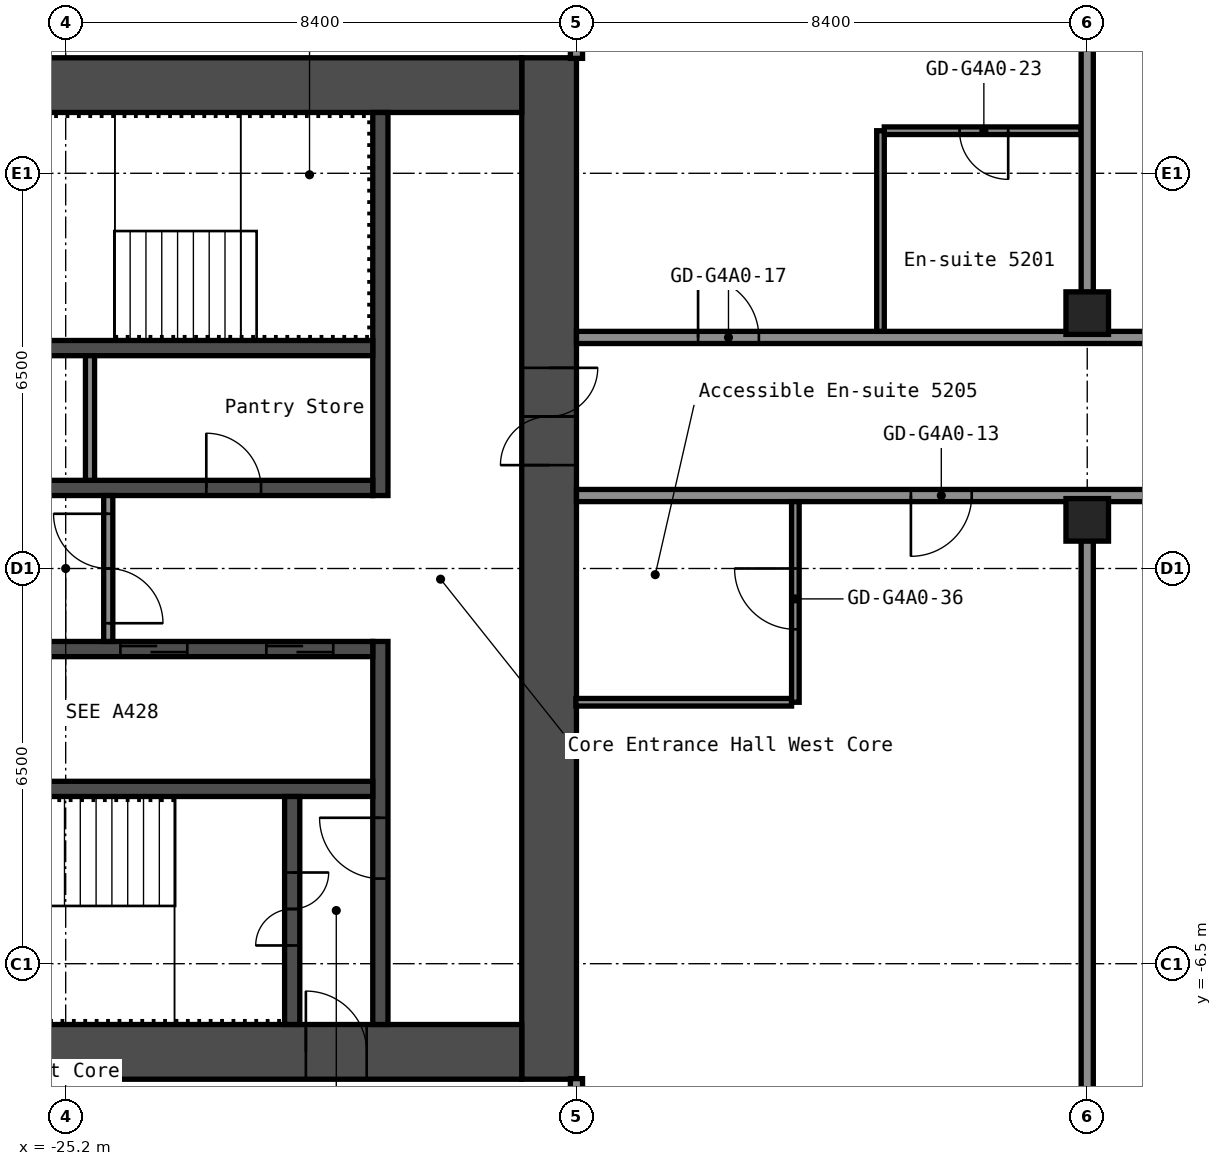
"""IFC4 building model, lengths in metres.
Left out: names, types, materials, properties, quantities, classifications, styles, units other than length and angle.
Written with IfcOpenShell. Run it as: python <this file> out.ifc"""

import sys

from ifc_helpers import new_model, si_unit, direction, frame, frame_2d, origin, origin_2d, place, context, subcontext, project, spatial, rectangle, hollow_rectangle, extrude, element, fill, save


model = new_model("IFC4")
c1 = context("Model", 3, precision=1e-05, world=origin(), true_north=direction((0.0, 1.0)))
c2 = subcontext(c1, "Body", "Model", "MODEL_VIEW")
j1 = project(units=[si_unit("LENGTHUNIT", "METRE"), si_unit("PLANEANGLEUNIT", "RADIAN")], contexts=[c1])
p1 = place(None, origin())
s1 = spatial("IfcSite", under=j1, at=p1, CompositionType="ELEMENT")
p2 = place(p1, origin())
s2 = spatial("IfcBuilding", under=s1, at=p2, CompositionType="ELEMENT")
p3 = place(p2, frame((0.0, 0.0, 186.6)))
s3 = spatial("IfcBuildingStorey", under=s2, at=p3, CompositionType="ELEMENT", Elevation=186.6)
for number, where, z_axis, x_axis in (
    (1, (-8.4, 0.8, 0.0), (0.0, 0.0, 1.0), (1.0, 0.0, 0.0)),
    (2, (-8.4, 4.2, 0.0), (0.0, 0.0, 1.0), (1.0, 0.0, 0.0)),
):
    element("IfcColumn", number, at=place(p3, frame(where, z_axis=z_axis, x_axis=x_axis)), inside=s3, PredefinedType="COLUMN", context=c2, shape_type="SweptSolid", body=[
        extrude(hollow_rectangle(XDim=0.7, YDim=0.7, WallThickness=0.028, at=origin_2d()), origin(), (0.0, 0.0, 1.0), 2.75),
    ])
p4 = place(p3, frame((-17.25, -8.4, 0.0), z_axis=(0.0, 0.0, 1.0), x_axis=(0.0, 1.0, 0.0)))
e3 = element("IfcWall", 3, at=p4, inside=s3, PredefinedType="SHEAR", context=c2, shape_type="SweptSolid", body=[
    extrude(rectangle(XDim=16.8, YDim=0.9, at=frame_2d((8.4, 0.0))), origin(), (0.0, 0.0, 1.0), 2.75),
])
p5 = place(p4, frame((10.1, 0.0, 0.0)))
e4 = element("IfcOpeningElement", 4, at=p5, cuts=e3, PredefinedType="OPENING", context=c2, shape_type="SweptSolid", body=[
    extrude(rectangle(XDim=1.6, YDim=2.1, at=frame_2d((0.8, 1.05))), frame((0.0, 0.46, 0.0), z_axis=(0.0, -1.0, 0.0), x_axis=(1.0, 0.0, 0.0)), (0.0, 0.0, 1.0), 0.92),
])
p6 = place(p3, frame((-32.7, 7.95, 0.0), z_axis=(0.0, 0.0, 1.0), x_axis=(1.0, 0.0, 0.0)))
e5 = element("IfcWall", 5, at=p6, inside=s3, PredefinedType="SHEAR", context=c2, shape_type="SweptSolid", body=[
    extrude(rectangle(XDim=15.0, YDim=0.9, at=frame_2d((7.5, 0.0))), origin(), (0.0, 0.0, 1.0), 2.75),
])
p7 = place(p6, frame((3.4, 0.0, 0.0)))
e6 = element("IfcOpeningElement", 6, at=p7, cuts=e5, PredefinedType="OPENING", context=c2, shape_type="SweptSolid", body=[
    extrude(rectangle(XDim=1.2, YDim=2.1, at=frame_2d((0.6, 1.05))), frame((0.0, 0.46, 0.0), z_axis=(0.0, -1.0, 0.0), x_axis=(1.0, 0.0, 0.0)), (0.0, 0.0, 1.0), 0.92),
])
p8 = place(p6, frame((0.75, 0.0, 0.0)))
e7 = element("IfcOpeningElement", 7, at=p8, cuts=e5, PredefinedType="OPENING", context=c2, shape_type="SweptSolid", body=[
    extrude(rectangle(XDim=0.9, YDim=2.1, at=frame_2d((0.45, 1.05))), frame((0.0, 0.46, 0.0), z_axis=(0.0, -1.0, 0.0), x_axis=(1.0, 0.0, 0.0)), (0.0, 0.0, 1.0), 0.92),
])
p9 = place(p3, frame((-32.7, -7.95, 0.0), z_axis=(0.0, 0.0, 1.0), x_axis=(1.0, 0.0, 0.0)))
e8 = element("IfcWall", 8, at=p9, inside=s3, PredefinedType="SHEAR", context=c2, shape_type="SweptSolid", body=[
    extrude(rectangle(XDim=15.0, YDim=0.9, at=frame_2d((7.5, 0.0))), origin(), (0.0, 0.0, 1.0), 2.75),
])
p10 = place(p9, frame((11.45, 0.0, 0.0)))
e9 = element("IfcOpeningElement", 9, at=p10, cuts=e8, PredefinedType="OPENING", context=c2, shape_type="SweptSolid", body=[
    extrude(rectangle(XDim=1.0, YDim=2.1, at=frame_2d((0.5, 1.05))), frame((0.0, 0.46, 0.0), z_axis=(0.0, -1.0, 0.0), x_axis=(1.0, 0.0, 0.0)), (0.0, 0.0, 1.0), 0.92),
])
p11 = place(p3, frame((-20.025, 1.2, 0.0), z_axis=(0.0, 0.0, 1.0), x_axis=(0.0, 1.0, 0.0)))
e10 = element("IfcWall", 10, at=p11, inside=s3, PredefinedType="SHEAR", context=c2, shape_type="SweptSolid", body=[
    extrude(rectangle(XDim=6.3, YDim=0.25, at=frame_2d((3.15, 0.0))), origin(), (0.0, 0.0, 1.0), 2.75),
])
p12 = place(p3, frame((-20.025, -7.5, 0.0), z_axis=(0.0, 0.0, 1.0), x_axis=(0.0, 1.0, 0.0)))
e11 = element("IfcWall", 11, at=p12, inside=s3, PredefinedType="SHEAR", context=c2, shape_type="SweptSolid", body=[
    extrude(rectangle(XDim=6.3, YDim=0.25, at=frame_2d((3.15, 0.0))), origin(), (0.0, 0.0, 1.0), 2.75),
])
p13 = place(p12, frame((2.4, 0.0, 0.0)))
e12 = element("IfcOpeningElement", 12, at=p13, cuts=e11, PredefinedType="OPENING", context=c2, shape_type="SweptSolid", body=[
    extrude(rectangle(XDim=1.0, YDim=2.1, at=frame_2d((0.5, 1.05))), frame((0.0, 0.135, 0.0), z_axis=(0.0, -1.0, 0.0), x_axis=(1.0, 0.0, 0.0)), (0.0, 0.0, 1.0), 0.27),
])
p14 = place(p3, frame((-27.65, 1.325, 0.0), z_axis=(0.0, 0.0, 1.0), x_axis=(1.0, 0.0, 0.0)))
e13 = element("IfcWall", 13, at=p14, inside=s3, PredefinedType="SHEAR", context=c2, shape_type="SweptSolid", body=[
    extrude(rectangle(XDim=7.5, YDim=0.25, at=frame_2d((3.75, 0.0))), origin(), (0.0, 0.0, 1.0), 2.75),
])
p15 = place(p14, frame((4.762, 0.0, 0.0)))
e14 = element("IfcOpeningElement", 14, at=p15, cuts=e13, PredefinedType="OPENING", context=c2, shape_type="SweptSolid", body=[
    extrude(rectangle(XDim=0.9, YDim=2.1, at=frame_2d((0.45, 1.05))), frame((0.0, 0.135, 0.0), z_axis=(0.0, -1.0, 0.0), x_axis=(1.0, 0.0, 0.0)), (0.0, 0.0, 1.0), 0.27),
])
p16 = place(p14, frame((1.062, 0.0, 0.0)))
e15 = element("IfcOpeningElement", 15, at=p16, cuts=e13, PredefinedType="OPENING", context=c2, shape_type="SweptSolid", body=[
    extrude(rectangle(XDim=0.9, YDim=2.1, at=frame_2d((0.45, 1.05))), frame((0.0, 0.135, 0.0), z_axis=(0.0, -1.0, 0.0), x_axis=(1.0, 0.0, 0.0)), (0.0, 0.0, 1.0), 0.27),
])
p17 = place(p3, frame((-27.65, 3.625, 0.0), z_axis=(0.0, 0.0, 1.0), x_axis=(1.0, 0.0, 0.0)))
e16 = element("IfcWall", 16, at=p17, inside=s3, PredefinedType="SHEAR", context=c2, shape_type="SweptSolid", body=[
    extrude(rectangle(XDim=7.5, YDim=0.25, at=frame_2d((3.75, 0.0))), origin(), (0.0, 0.0, 1.0), 2.75),
])
p18 = place(p3, frame((-27.65, -1.325, 0.0), z_axis=(0.0, 0.0, 1.0), x_axis=(1.0, 0.0, 0.0)))
e17 = element("IfcWall", 17, at=p18, inside=s3, PredefinedType="SHEAR", context=c2, shape_type="SweptSolid", body=[
    extrude(rectangle(XDim=7.5, YDim=0.25, at=frame_2d((3.75, 0.0))), origin(), (0.0, 0.0, 1.0), 2.75),
])
p19 = place(p18, frame((5.75, 0.0, 0.0)))
e18 = element("IfcOpeningElement", 18, at=p19, cuts=e17, PredefinedType="OPENING", context=c2, shape_type="SweptSolid", body=[
    extrude(rectangle(XDim=1.1, YDim=2.1, at=frame_2d((0.55, 1.05))), frame((0.0, 0.135, 0.0), z_axis=(0.0, -1.0, 0.0), x_axis=(1.0, 0.0, 0.0)), (0.0, 0.0, 1.0), 0.27),
])
p20 = place(p18, frame((3.35, 0.0, 0.0)))
e19 = element("IfcOpeningElement", 19, at=p20, cuts=e17, PredefinedType="OPENING", context=c2, shape_type="SweptSolid", body=[
    extrude(rectangle(XDim=1.1, YDim=2.1, at=frame_2d((0.55, 1.05))), frame((0.0, 0.135, 0.0), z_axis=(0.0, -1.0, 0.0), x_axis=(1.0, 0.0, 0.0)), (0.0, 0.0, 1.0), 0.27),
])
p21 = place(p18, frame((0.95, 0.0, 0.0)))
e20 = element("IfcOpeningElement", 20, at=p21, cuts=e17, PredefinedType="OPENING", context=c2, shape_type="SweptSolid", body=[
    extrude(rectangle(XDim=1.1, YDim=2.1, at=frame_2d((0.55, 1.05))), frame((0.0, 0.135, 0.0), z_axis=(0.0, -1.0, 0.0), x_axis=(1.0, 0.0, 0.0)), (0.0, 0.0, 1.0), 0.27),
])
p22 = place(p3, frame((-27.65, -3.625, 0.0), z_axis=(0.0, 0.0, 1.0), x_axis=(1.0, 0.0, 0.0)))
e21 = element("IfcWall", 21, at=p22, inside=s3, PredefinedType="SHEAR", context=c2, shape_type="SweptSolid", body=[
    extrude(rectangle(XDim=7.5, YDim=0.25, at=frame_2d((3.75, 0.0))), origin(), (0.0, 0.0, 1.0), 2.75),
])
p23 = place(p3, frame((-21.475, -7.5, 0.0), z_axis=(0.0, 0.0, 1.0), x_axis=(0.0, 1.0, 0.0)))
e22 = element("IfcWall", 22, at=p23, inside=s3, PredefinedType="SHEAR", context=c2, shape_type="SweptSolid", body=[
    extrude(rectangle(XDim=3.75, YDim=0.25, at=frame_2d((1.875, 0.0))), origin(), (0.0, 0.0, 1.0), 2.75),
])
p24 = place(p23, frame((1.3, 0.0, 0.0)))
e23 = element("IfcOpeningElement", 23, at=p24, cuts=e22, PredefinedType="OPENING", context=c2, shape_type="SweptSolid", body=[
    extrude(rectangle(XDim=1.2, YDim=2.1, at=frame_2d((0.6, 1.05))), frame((0.0, 0.135, 0.0), z_axis=(0.0, -1.0, 0.0), x_axis=(1.0, 0.0, 0.0)), (0.0, 0.0, 1.0), 0.27),
])
p25 = place(p3, frame((-24.5, -1.2, 0.0), z_axis=(0.0, 0.0, 1.0), x_axis=(0.0, 1.0, 0.0)))
e24 = element("IfcWall", 24, at=p25, inside=s3, PredefinedType="PARTITIONING", context=c2, shape_type="SweptSolid", body=[
    extrude(rectangle(XDim=2.4, YDim=0.15, at=frame_2d((1.2, 0.0))), origin(), (0.0, 0.0, 1.0), 2.75),
])
p26 = place(p25, frame((0.3, 0.0, 0.0)))
e25 = element("IfcOpeningElement", 25, at=p26, cuts=e24, PredefinedType="OPENING", context=c2, shape_type="SweptSolid", body=[
    extrude(rectangle(XDim=1.8, YDim=2.1, at=frame_2d((0.9, 1.05))), frame((0.0, 0.085, 0.0), z_axis=(0.0, -1.0, 0.0), x_axis=(1.0, 0.0, 0.0)), (0.0, 0.0, 1.0), 0.17),
])
p27 = place(p3, frame((-24.8, 1.45, 0.0), z_axis=(0.0, 0.0, 1.0), x_axis=(0.0, 1.0, 0.0)))
e26 = element("IfcWall", 26, at=p27, inside=s3, PredefinedType="PARTITIONING", context=c2, shape_type="SweptSolid", body=[
    extrude(rectangle(XDim=2.05, YDim=0.15, at=frame_2d((1.025, 0.0))), origin(), (0.0, 0.0, 1.0), 2.75),
])
p28 = place(p3, frame((-16.81, -2.2, 0.0), z_axis=(0.0, 0.0, 1.0), x_axis=(1.0, 0.0, 0.0)))
e27 = element("IfcWall", 27, at=p28, inside=s3, PredefinedType="PARTITIONING", context=c2, shape_type="SweptSolid", body=[
    extrude(rectangle(XDim=3.548, YDim=0.125, at=frame_2d((1.774, 0.0))), origin(), (0.0, 0.0, 1.0), 2.75),
])
p29 = place(p3, frame((-16.8, 1.2, 0.0), z_axis=(0.0, 0.0, 1.0), x_axis=(1.0, 0.0, 0.0)))
e28 = element("IfcWall", 28, at=p29, inside=s3, PredefinedType="PARTITIONING", context=c2, shape_type="SweptSolid", body=[
    extrude(rectangle(XDim=33.6, YDim=0.2, at=frame_2d((16.8, 0.0))), origin(), (0.0, 0.0, 1.0), 2.75),
])
p30 = place(p29, frame((5.5, 0.0, 0.0)))
e29 = element("IfcOpeningElement", 29, at=p30, cuts=e28, PredefinedType="OPENING", context=c2, shape_type="SweptSolid", body=[
    extrude(rectangle(XDim=1.0, YDim=2.1, at=frame_2d((0.5, 1.05))), frame((0.0, 0.11, 0.0), z_axis=(0.0, -1.0, 0.0), x_axis=(1.0, 0.0, 0.0)), (0.0, 0.0, 1.0), 0.22),
])
p31 = place(p29, frame((12.1, 0.0, 0.0)))
e30 = element("IfcOpeningElement", 30, at=p31, cuts=e28, PredefinedType="OPENING", context=c2, shape_type="SweptSolid", body=[
    extrude(rectangle(XDim=1.0, YDim=2.1, at=frame_2d((0.5, 1.05))), frame((0.0, 0.11, 0.0), z_axis=(0.0, -1.0, 0.0), x_axis=(1.0, 0.0, 0.0)), (0.0, 0.0, 1.0), 0.22),
])
p32 = place(p29, frame((22.2, 0.0, 0.0)))
e31 = element("IfcOpeningElement", 31, at=p32, cuts=e28, PredefinedType="OPENING", context=c2, shape_type="SweptSolid", body=[
    extrude(rectangle(XDim=1.0, YDim=2.1, at=frame_2d((0.5, 1.05))), frame((0.0, 0.11, 0.0), z_axis=(0.0, -1.0, 0.0), x_axis=(1.0, 0.0, 0.0)), (0.0, 0.0, 1.0), 0.22),
])
p33 = place(p29, frame((30.6, 0.0, 0.0)))
e32 = element("IfcOpeningElement", 32, at=p33, cuts=e28, PredefinedType="OPENING", context=c2, shape_type="SweptSolid", body=[
    extrude(rectangle(XDim=1.0, YDim=2.1, at=frame_2d((0.5, 1.05))), frame((0.0, 0.11, 0.0), z_axis=(0.0, -1.0, 0.0), x_axis=(1.0, 0.0, 0.0)), (0.0, 0.0, 1.0), 0.22),
])
p34 = place(p3, frame((-16.8, 3.8, 0.0), z_axis=(0.0, 0.0, 1.0), x_axis=(1.0, 0.0, 0.0)))
e33 = element("IfcWall", 33, at=p34, inside=s3, PredefinedType="PARTITIONING", context=c2, shape_type="SweptSolid", body=[
    extrude(rectangle(XDim=33.6, YDim=0.2, at=frame_2d((16.8, 0.0))), origin(), (0.0, 0.0, 1.0), 2.75),
])
p35 = place(p34, frame((2.0, 0.0, 0.0)))
e34 = element("IfcOpeningElement", 34, at=p35, cuts=e33, PredefinedType="OPENING", context=c2, shape_type="SweptSolid", body=[
    extrude(rectangle(XDim=1.0, YDim=2.1, at=frame_2d((0.5, 1.05))), frame((0.0, 0.11, 0.0), z_axis=(0.0, -1.0, 0.0), x_axis=(1.0, 0.0, 0.0)), (0.0, 0.0, 1.0), 0.22),
])
p36 = place(p34, frame((10.555, 0.0, 0.0)))
e35 = element("IfcOpeningElement", 35, at=p36, cuts=e33, PredefinedType="OPENING", context=c2, shape_type="SweptSolid", body=[
    extrude(rectangle(XDim=0.9, YDim=2.1, at=frame_2d((0.45, 1.05))), frame((0.0, 0.11, 0.0), z_axis=(0.0, -1.0, 0.0), x_axis=(1.0, 0.0, 0.0)), (0.0, 0.0, 1.0), 0.22),
])
p37 = place(p34, frame((14.755, 0.0, 0.0)))
e36 = element("IfcOpeningElement", 36, at=p37, cuts=e33, PredefinedType="OPENING", context=c2, shape_type="SweptSolid", body=[
    extrude(rectangle(XDim=0.9, YDim=2.1, at=frame_2d((0.45, 1.05))), frame((0.0, 0.11, 0.0), z_axis=(0.0, -1.0, 0.0), x_axis=(1.0, 0.0, 0.0)), (0.0, 0.0, 1.0), 0.22),
])
p38 = place(p34, frame((18.785, 0.0, 0.0)))
e37 = element("IfcOpeningElement", 37, at=p38, cuts=e33, PredefinedType="OPENING", context=c2, shape_type="SweptSolid", body=[
    extrude(rectangle(XDim=0.9, YDim=2.1, at=frame_2d((0.45, 1.05))), frame((0.0, 0.11, 0.0), z_axis=(0.0, -1.0, 0.0), x_axis=(1.0, 0.0, 0.0)), (0.0, 0.0, 1.0), 0.22),
])
p39 = place(p34, frame((22.985, 0.0, 0.0)))
e38 = element("IfcOpeningElement", 38, at=p39, cuts=e33, PredefinedType="OPENING", context=c2, shape_type="SweptSolid", body=[
    extrude(rectangle(XDim=0.9, YDim=2.1, at=frame_2d((0.45, 1.05))), frame((0.0, 0.11, 0.0), z_axis=(0.0, -1.0, 0.0), x_axis=(1.0, 0.0, 0.0)), (0.0, 0.0, 1.0), 0.22),
])
p40 = place(p34, frame((30.6, 0.0, 0.0)))
e39 = element("IfcOpeningElement", 39, at=p40, cuts=e33, PredefinedType="OPENING", context=c2, shape_type="SweptSolid", body=[
    extrude(rectangle(XDim=1.0, YDim=2.1, at=frame_2d((0.5, 1.05))), frame((0.0, 0.11, 0.0), z_axis=(0.0, -1.0, 0.0), x_axis=(1.0, 0.0, 0.0)), (0.0, 0.0, 1.0), 0.22),
])
p41 = place(p3, frame((-11.738, 7.2, 0.0), z_axis=(0.0, 0.0, 1.0), x_axis=(1.0, 0.0, 0.0)))
e40 = element("IfcWall", 40, at=p41, inside=s3, PredefinedType="PARTITIONING", context=c2, shape_type="SweptSolid", body=[
    extrude(rectangle(XDim=3.238, YDim=0.125, at=frame_2d((1.619, 0.0))), origin(), (0.0, 0.0, 1.0), 2.75),
])
p42 = place(p41, frame((1.238, 0.0, 0.0)))
e41 = element("IfcOpeningElement", 41, at=p42, cuts=e40, PredefinedType="OPENING", context=c2, shape_type="SweptSolid", body=[
    extrude(rectangle(XDim=0.8, YDim=2.1, at=frame_2d((0.4, 1.05))), frame((0.0, 0.073, 0.0), z_axis=(0.0, -1.0, 0.0), x_axis=(1.0, 0.0, 0.0)), (0.0, 0.0, 1.0), 0.145),
])
p43 = place(p3, frame((-16.8, -15.55, 0.0), z_axis=(0.0, 0.0, 1.0), x_axis=(0.0, 1.0, 0.0)))
e42 = element("IfcWall", 42, at=p43, inside=s3, PredefinedType="PARTITIONING", context=c2, shape_type="SweptSolid", body=[
    extrude(rectangle(XDim=7.16, YDim=0.2, at=frame_2d((3.58, 0.0))), origin(), (0.0, 0.0, 1.0), 2.75),
])
p44 = place(p3, frame((-16.8, 8.39, 0.0), z_axis=(0.0, 0.0, 1.0), x_axis=(0.0, 1.0, 0.0)))
e43 = element("IfcWall", 43, at=p44, inside=s3, PredefinedType="PARTITIONING", context=c2, shape_type="SweptSolid", body=[
    extrude(rectangle(XDim=12.16, YDim=0.2, at=frame_2d((6.08, 0.0))), origin(), (0.0, 0.0, 1.0), 2.75),
])
p45 = place(p3, frame((-13.2, -2.2, 0.0), z_axis=(0.0, 0.0, 1.0), x_axis=(0.0, 1.0, 0.0)))
e44 = element("IfcWall", 44, at=p45, inside=s3, PredefinedType="PARTITIONING", context=c2, shape_type="SweptSolid", body=[
    extrude(rectangle(XDim=3.3, YDim=0.125, at=frame_2d((1.65, 0.0))), origin(), (0.0, 0.0, 1.0), 2.75),
])
p46 = place(p45, frame((1.2, 0.0, 0.0)))
e45 = element("IfcOpeningElement", 45, at=p46, cuts=e44, PredefinedType="OPENING", context=c2, shape_type="SweptSolid", body=[
    extrude(rectangle(XDim=1.0, YDim=2.1, at=frame_2d((0.5, 1.05))), frame((0.0, 0.073, 0.0), z_axis=(0.0, -1.0, 0.0), x_axis=(1.0, 0.0, 0.0)), (0.0, 0.0, 1.0), 0.145),
])
p47 = place(p3, frame((-11.8, 3.9, 0.0), z_axis=(0.0, 0.0, 1.0), x_axis=(0.0, 1.0, 0.0)))
e46 = element("IfcWall", 46, at=p47, inside=s3, PredefinedType="PARTITIONING", context=c2, shape_type="SweptSolid", body=[
    extrude(rectangle(XDim=3.3, YDim=0.125, at=frame_2d((1.65, 0.0))), origin(), (0.0, 0.0, 1.0), 2.75),
])
for number, where, z_axis, x_axis in (
    (47, (-8.4, -15.55, 0.0), (0.0, 0.0, 1.0), (0.0, 1.0, 0.0)),
    (48, (-8.4, 4.54, 0.0), (0.0, 0.0, 1.0), (0.0, 1.0, 0.0)),
):
    element("IfcWall", number, at=place(p3, frame(where, z_axis=z_axis, x_axis=x_axis)), inside=s3, PredefinedType="PARTITIONING", context=c2, shape_type="SweptSolid", body=[
        extrude(rectangle(XDim=16.01, YDim=0.2, at=frame_2d((8.005, 0.0))), origin(), (0.0, 0.0, 1.0), 2.75),
    ])
p48 = place(p5, origin())
e49 = element("IfcDoor", 49, at=p48, inside=s3, OperationType="DOUBLE_DOOR_SINGLE_SWING", PredefinedType="DOOR", context=c2, shape_type="SweptSolid", body=[
    extrude(rectangle(XDim=1.6, YDim=2.1, at=frame_2d((0.8, 1.05))), frame((0.0, 0.025, 0.0), z_axis=(0.0, -1.0, 0.0), x_axis=(1.0, 0.0, 0.0)), (0.0, 0.0, 1.0), 0.05),
])
fill(e4, e49)
p49 = place(p10, origin())
e50 = element("IfcDoor", 50, at=p49, inside=s3, OperationType="SINGLE_SWING_RIGHT", PredefinedType="DOOR", context=c2, shape_type="SweptSolid", body=[
    extrude(rectangle(XDim=1.0, YDim=2.1, at=frame_2d((0.5, 1.05))), frame((0.0, 0.025, 0.0), z_axis=(0.0, -1.0, 0.0), x_axis=(1.0, 0.0, 0.0)), (0.0, 0.0, 1.0), 0.05),
])
fill(e9, e50)
p50 = place(p24, origin())
e51 = element("IfcDoor", 51, at=p50, inside=s3, OperationType="DOUBLE_DOOR_SINGLE_SWING", PredefinedType="DOOR", context=c2, shape_type="SweptSolid", body=[
    extrude(rectangle(XDim=1.2, YDim=2.1, at=frame_2d((0.6, 1.05))), frame((0.0, 0.025, 0.0), z_axis=(0.0, -1.0, 0.0), x_axis=(1.0, 0.0, 0.0)), (0.0, 0.0, 1.0), 0.05),
])
fill(e23, e51)
p51 = place(p13, origin())
e52 = element("IfcDoor", 52, at=p51, inside=s3, OperationType="SINGLE_SWING_LEFT", PredefinedType="DOOR", context=c2, shape_type="SweptSolid", body=[
    extrude(rectangle(XDim=1.0, YDim=2.1, at=frame_2d((0.5, 1.05))), frame((0.0, 0.025, 0.0), z_axis=(0.0, -1.0, 0.0), x_axis=(1.0, 0.0, 0.0)), (0.0, 0.0, 1.0), 0.05),
])
fill(e12, e52)
p52 = place(p26, origin())
e53 = element("IfcDoor", 53, at=p52, inside=s3, OperationType="DOUBLE_DOOR_SINGLE_SWING", PredefinedType="DOOR", context=c2, shape_type="SweptSolid", body=[
    extrude(rectangle(XDim=1.8, YDim=2.1, at=frame_2d((0.9, 1.05))), frame((0.0, 0.025, 0.0), z_axis=(0.0, -1.0, 0.0), x_axis=(1.0, 0.0, 0.0)), (0.0, 0.0, 1.0), 0.05),
])
fill(e25, e53)
p53 = place(p15, origin())
e54 = element("IfcDoor", 54, at=p53, inside=s3, OperationType="SINGLE_SWING_RIGHT", PredefinedType="DOOR", context=c2, shape_type="SweptSolid", body=[
    extrude(rectangle(XDim=0.9, YDim=2.1, at=frame_2d((0.45, 1.05))), frame((0.0, 0.025, 0.0), z_axis=(0.0, -1.0, 0.0), x_axis=(1.0, 0.0, 0.0)), (0.0, 0.0, 1.0), 0.05),
])
fill(e14, e54)
p54 = place(p19, origin())
e55 = element("IfcDoor", 55, at=p54, inside=s3, OperationType="DOUBLE_DOOR_SLIDING", PredefinedType="DOOR", context=c2, shape_type="SweptSolid", body=[
    extrude(rectangle(XDim=1.1, YDim=2.1, at=frame_2d((0.55, 1.05))), frame((0.0, 0.025, 0.0), z_axis=(0.0, -1.0, 0.0), x_axis=(1.0, 0.0, 0.0)), (0.0, 0.0, 1.0), 0.05),
])
fill(e18, e55)
p55 = place(p20, origin())
e56 = element("IfcDoor", 56, at=p55, inside=s3, OperationType="DOUBLE_DOOR_SLIDING", PredefinedType="DOOR", context=c2, shape_type="SweptSolid", body=[
    extrude(rectangle(XDim=1.1, YDim=2.1, at=frame_2d((0.55, 1.05))), frame((0.0, 0.025, 0.0), z_axis=(0.0, -1.0, 0.0), x_axis=(1.0, 0.0, 0.0)), (0.0, 0.0, 1.0), 0.05),
])
fill(e19, e56)
p56 = place(p30, origin())
e57 = element("IfcDoor", 57, at=p56, inside=s3, OperationType="SINGLE_SWING_LEFT", PredefinedType="DOOR", context=c2, shape_type="SweptSolid", body=[
    extrude(rectangle(XDim=1.0, YDim=2.1, at=frame_2d((0.5, 1.05))), frame((0.0, 0.025, 0.0), z_axis=(0.0, -1.0, 0.0), x_axis=(1.0, 0.0, 0.0)), (0.0, 0.0, 1.0), 0.05),
])
fill(e29, e57)
p57 = place(p35, origin())
e58 = element("IfcDoor", 58, at=p57, inside=s3, OperationType="SINGLE_SWING_RIGHT", PredefinedType="DOOR", context=c2, shape_type="SweptSolid", body=[
    extrude(rectangle(XDim=1.0, YDim=2.1, at=frame_2d((0.5, 1.05))), frame((0.0, 0.025, 0.0), z_axis=(0.0, -1.0, 0.0), x_axis=(1.0, 0.0, 0.0)), (0.0, 0.0, 1.0), 0.05),
])
fill(e34, e58)
p58 = place(p42, origin())
e59 = element("IfcDoor", 59, at=p58, inside=s3, OperationType="SINGLE_SWING_RIGHT", PredefinedType="DOOR", context=c2, shape_type="SweptSolid", body=[
    extrude(rectangle(XDim=0.8, YDim=2.1, at=frame_2d((0.4, 1.05))), frame((0.0, 0.025, 0.0), z_axis=(0.0, -1.0, 0.0), x_axis=(1.0, 0.0, 0.0)), (0.0, 0.0, 1.0), 0.05),
])
fill(e41, e59)
p59 = place(p46, origin())
e60 = element("IfcDoor", 60, at=p59, inside=s3, OperationType="SINGLE_SWING_LEFT", PredefinedType="DOOR", context=c2, shape_type="SweptSolid", body=[
    extrude(rectangle(XDim=1.0, YDim=2.1, at=frame_2d((0.5, 1.05))), frame((0.0, 0.025, 0.0), z_axis=(0.0, -1.0, 0.0), x_axis=(1.0, 0.0, 0.0)), (0.0, 0.0, 1.0), 0.05),
])
fill(e45, e60)
save(model, sys.argv[1])
